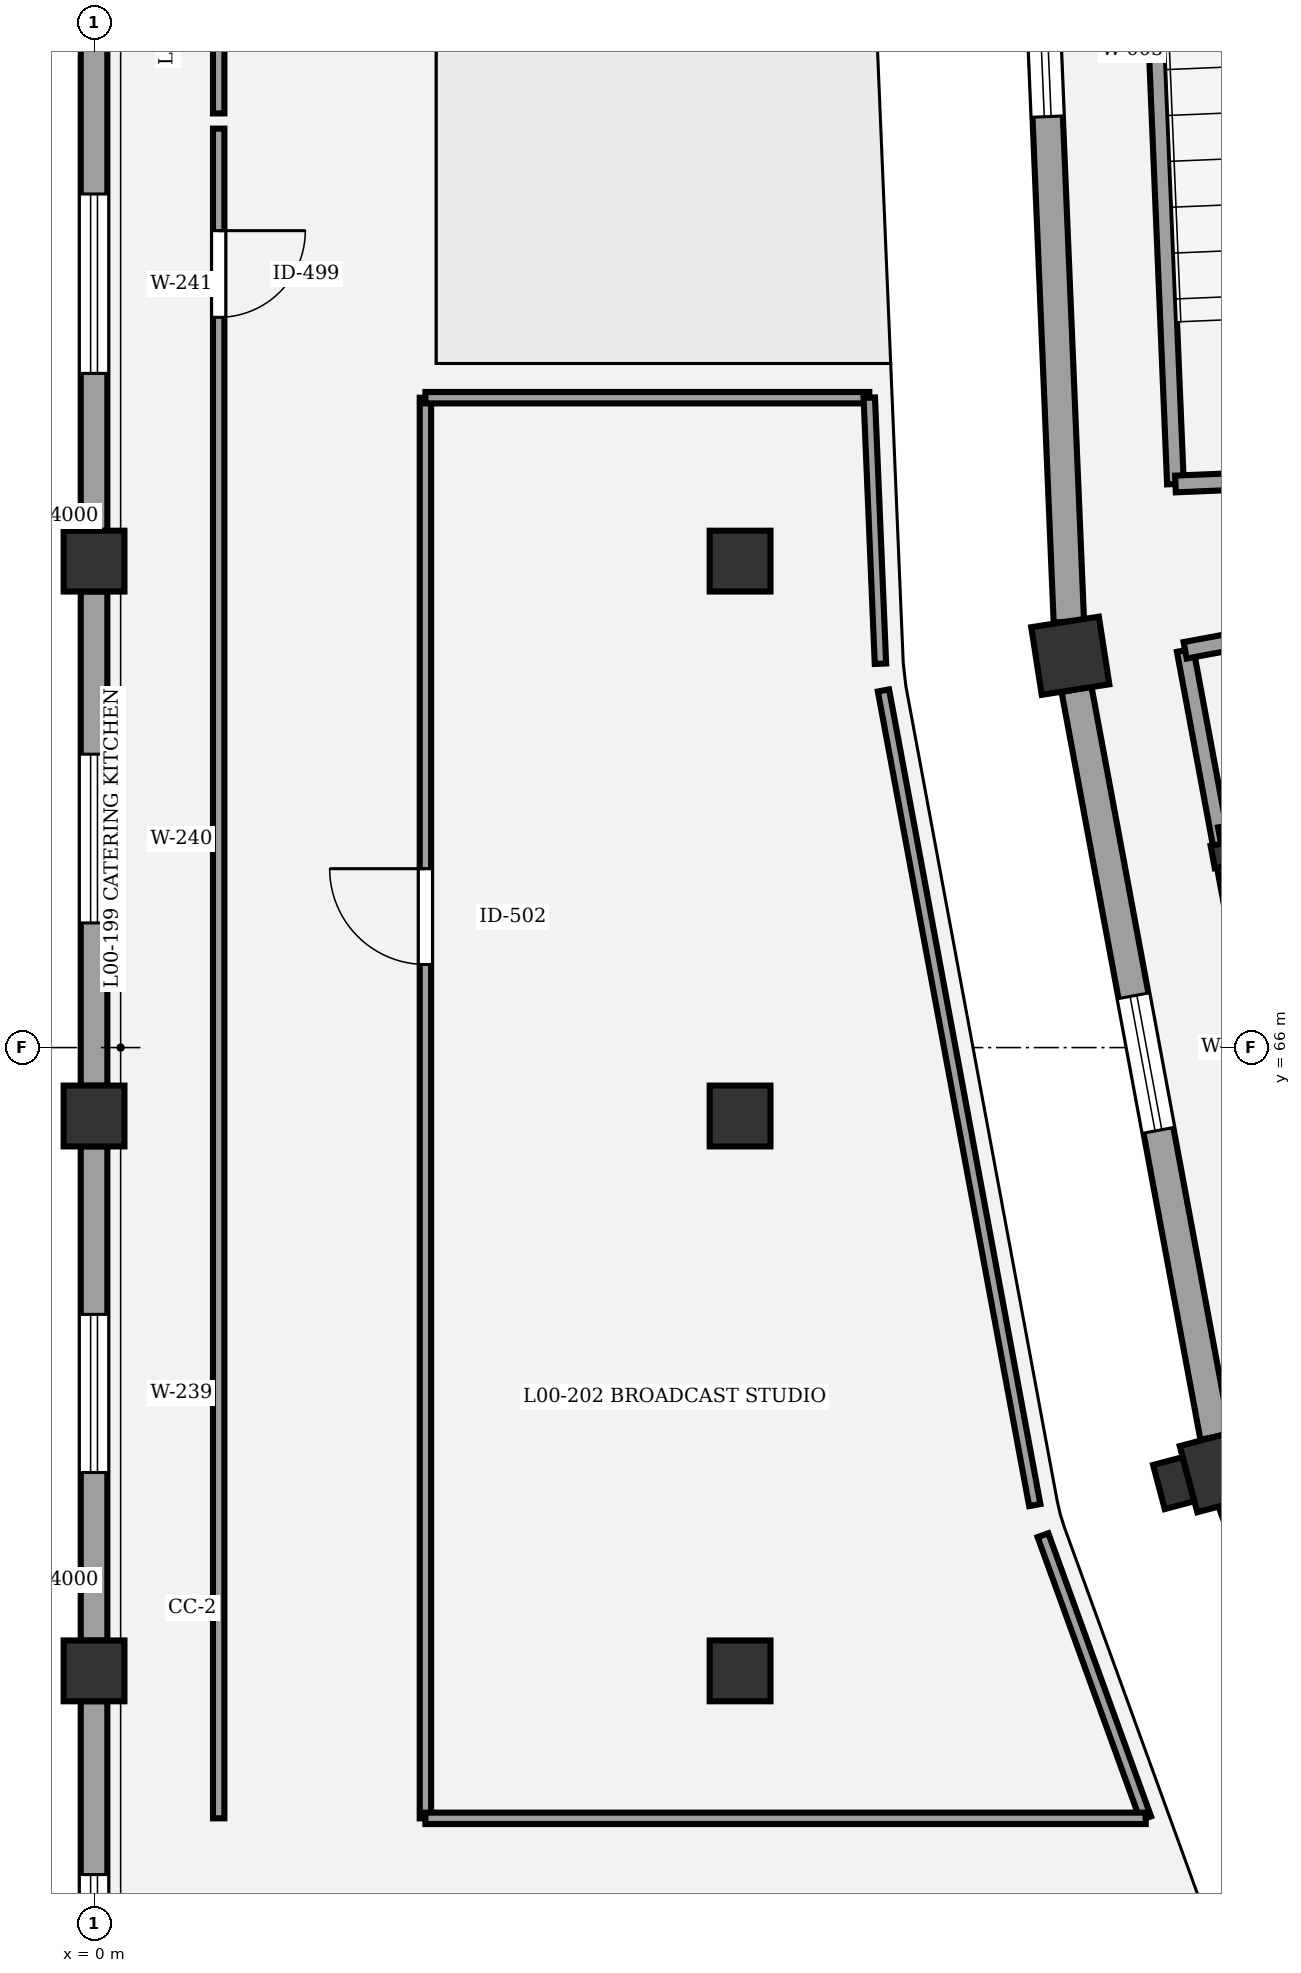
"""IFC4 building model, lengths in metres.
Left out: names, types, materials, properties, quantities, classifications, styles, units other than length and angle.
Written with IfcOpenShell. Run it as: python <this file> out.ifc"""

import sys

from ifc_helpers import new_model, si_unit, direction, frame, frame_2d, origin, origin_2d, place, context, subcontext, project, spatial, rectangle, circle, extrude, element, fill, save


model = new_model("IFC4")
c1 = context("Model", 3, precision=1e-05, world=origin(), true_north=direction((0.0, 1.0)))
c2 = subcontext(c1, "Body", "Model", "MODEL_VIEW")
j1 = project(units=[si_unit("LENGTHUNIT", "METRE"), si_unit("PLANEANGLEUNIT", "RADIAN")], contexts=[c1])
p1 = place(None, origin())
s1 = spatial("IfcSite", under=j1, at=p1, CompositionType="ELEMENT")
p2 = place(p1, origin())
s2 = spatial("IfcBuilding", under=s1, at=p2, CompositionType="ELEMENT")
p3 = place(p2, origin())
s3 = spatial("IfcBuildingStorey", under=s2, at=p3, CompositionType="ELEMENT", Elevation=0.0)
for number, where, z_axis, x_axis in (
    (1, (12.844, 71.155, 0.0), (0.0, 0.0, 1.0), (-0.988, -0.153, 0.0)),
    (2, (14.835, 60.438, 0.0), (0.0, 0.0, 1.0), (-0.967, -0.256, 0.0)),
):
    element("IfcColumn", number, at=place(p3, frame(where, z_axis=z_axis, x_axis=x_axis)), inside=s3, PredefinedType="COLUMN", context=c2, shape_type="SweptSolid", body=[
        extrude(rectangle(XDim=0.9, YDim=0.9, at=origin_2d()), origin(), (0.0, 0.0, 1.0), 5.4),
    ])
p4 = place(p3, frame((14.204, 60.27, 0.0), z_axis=(0.0, 0.0, 1.0), x_axis=(0.256289373133, -0.966600102017, 0.0)))
e3 = element("IfcColumn", 3, at=p4, inside=s3, PredefinedType="PILASTER", context=c2, shape_type="SweptSolid", body=[
    extrude(rectangle(XDim=0.6, YDim=0.4, at=origin_2d()), origin(), (0.0, 0.0, 1.0), 5.4),
])
for number, where, z_axis, x_axis in (
    (4, (0.0, 57.8, 0.0), (0.0, 0.0, 1.0), (1.0, 0.0, 0.0)),
    (5, (0.0, 65.1, 0.0), (0.0, 0.0, 1.0), (1.0, 0.0, 0.0)),
    (6, (0.0, 72.4, 0.0), (0.0, 0.0, 1.0), (1.0, 0.0, 0.0)),
    (7, (8.5, 57.8, 0.0), (0.0, 0.0, 1.0), (1.0, 0.0, 0.0)),
    (8, (8.5, 65.1, 0.0), (0.0, 0.0, 1.0), (1.0, 0.0, 0.0)),
    (9, (8.5, 72.4, 0.0), (0.0, 0.0, 1.0), (1.0, 0.0, 0.0)),
):
    element("IfcColumn", number, at=place(p3, frame(where, z_axis=z_axis, x_axis=x_axis)), inside=s3, PredefinedType="COLUMN", context=c2, shape_type="SweptSolid", body=[
        extrude(circle(Radius=0.4, at=origin_2d()), origin(), (0.0, 0.0, 1.0), 5.4),
    ])
p5 = place(p3, frame((12.826, 71.603, 0.0), z_axis=(0.0, 0.0, 1.0), x_axis=(-0.041899972393, 0.999121810548, 0.0)))
e10 = element("IfcWall", 10, at=p5, inside=s3, PredefinedType="STANDARD", context=c2, shape_type="SweptSolid", body=[
    extrude(rectangle(XDim=14.963, YDim=0.4, at=frame_2d((7.481, 0.0))), origin(), (0.0, 0.0, 1.0), 4.25),
])
p6 = place(p5, frame((6.652, 0.0, 1.1)))
e11 = element("IfcOpeningElement", 11, at=p6, cuts=e10, PredefinedType="OPENING", context=c2, shape_type="SweptSolid", body=[
    extrude(rectangle(XDim=1.66, YDim=1.55, at=frame_2d((0.83, 0.775))), frame((0.0, 0.21, 0.0), z_axis=(0.0, -1.0, 0.0), x_axis=(1.0, 0.0, 0.0)), (0.0, 0.0, 1.0), 0.42),
])
p7 = place(p3, frame((14.754, 60.878, 0.0), z_axis=(0.0, 0.0, 1.0), x_axis=(-0.182624880635, 0.98318266511, 0.0)))
e12 = element("IfcWall", 12, at=p7, inside=s3, PredefinedType="STANDARD", context=c2, shape_type="SweptSolid", body=[
    extrude(rectangle(XDim=10.005, YDim=0.4, at=frame_2d((5.002, 0.0))), origin(), (0.0, 0.0, 1.0), 4.25),
])
p8 = place(p7, frame((4.102, 0.0, 1.1)))
e13 = element("IfcOpeningElement", 13, at=p8, cuts=e12, PredefinedType="OPENING", context=c2, shape_type="SweptSolid", body=[
    extrude(rectangle(XDim=1.8, YDim=1.55, at=frame_2d((0.9, 0.775))), frame((0.0, 0.21, 0.0), z_axis=(0.0, -1.0, 0.0), x_axis=(1.0, 0.0, 0.0)), (0.0, 0.0, 1.0), 0.42),
])
p9 = place(p3, frame((17.991, 51.739, 0.0), z_axis=(0.0, 0.0, 1.0), x_axis=(-0.341030587203, 0.940052199929, 0.0)))
e14 = element("IfcWall", 14, at=p9, inside=s3, PredefinedType="STANDARD", context=c2, shape_type="SweptSolid", body=[
    extrude(rectangle(XDim=8.805, YDim=0.4, at=frame_2d((4.403, 0.0))), origin(), (0.0, 0.0, 1.0), 4.25),
])
p10 = place(p9, frame((3.603, 0.0, 0.0)))
e15 = element("IfcOpeningElement", 15, at=p10, cuts=e14, PredefinedType="OPENING", context=c2, shape_type="SweptSolid", body=[
    extrude(rectangle(XDim=1.6, YDim=2.3, at=frame_2d((0.8, 1.15))), frame((0.0, 0.21, 0.0), z_axis=(0.0, -1.0, 0.0), x_axis=(1.0, 0.0, 0.0)), (0.0, 0.0, 1.0), 0.42),
])
p11 = place(p3, frame((0.0, 50.898, 0.0), z_axis=(0.0, 0.0, 1.0), x_axis=(0.0, 1.0, 0.0)))
e16 = element("IfcWall", 16, at=p11, inside=s3, PredefinedType="STANDARD", context=c2, shape_type="SweptSolid", body=[
    extrude(rectangle(XDim=6.504, YDim=0.35, at=frame_2d((3.252, 0.0))), origin(), (0.0, 0.0, 1.0), 4.16),
])
p12 = place(p11, frame((2.282, 0.0, 0.9)))
e17 = element("IfcOpeningElement", 17, at=p12, cuts=e16, PredefinedType="OPENING", context=c2, shape_type="SweptSolid", body=[
    extrude(rectangle(XDim=1.94, YDim=1.75, at=frame_2d((0.97, 0.875))), frame((0.0, 0.185, 0.0), z_axis=(0.0, -1.0, 0.0), x_axis=(1.0, 0.0, 0.0)), (0.0, 0.0, 1.0), 0.37),
])
p13 = place(p3, frame((0.0, 58.198, 0.0), z_axis=(0.0, 0.0, 1.0), x_axis=(0.0, 1.0, 0.0)))
e18 = element("IfcWall", 18, at=p13, inside=s3, PredefinedType="STANDARD", context=c2, shape_type="SweptSolid", body=[
    extrude(rectangle(XDim=6.504, YDim=0.35, at=frame_2d((3.252, 0.0))), origin(), (0.0, 0.0, 1.0), 4.16),
])
p14 = place(p13, frame((2.212, 0.0, 0.9)))
e19 = element("IfcOpeningElement", 19, at=p14, cuts=e18, PredefinedType="OPENING", context=c2, shape_type="SweptSolid", body=[
    extrude(rectangle(XDim=2.08, YDim=1.75, at=frame_2d((1.04, 0.875))), frame((0.0, 0.185, 0.0), z_axis=(0.0, -1.0, 0.0), x_axis=(1.0, 0.0, 0.0)), (0.0, 0.0, 1.0), 0.37),
])
p15 = place(p3, frame((0.0, 65.498, 0.0), z_axis=(0.0, 0.0, 1.0), x_axis=(0.0, 1.0, 0.0)))
e20 = element("IfcWall", 20, at=p15, inside=s3, PredefinedType="STANDARD", context=c2, shape_type="SweptSolid", body=[
    extrude(rectangle(XDim=6.504, YDim=0.35, at=frame_2d((3.252, 0.0))), origin(), (0.0, 0.0, 1.0), 4.16),
])
p16 = place(p15, frame((2.142, 0.0, 0.9)))
e21 = element("IfcOpeningElement", 21, at=p16, cuts=e20, PredefinedType="OPENING", context=c2, shape_type="SweptSolid", body=[
    extrude(rectangle(XDim=2.22, YDim=1.75, at=frame_2d((1.11, 0.875))), frame((0.0, 0.185, 0.0), z_axis=(0.0, -1.0, 0.0), x_axis=(1.0, 0.0, 0.0)), (0.0, 0.0, 1.0), 0.37),
])
p17 = place(p3, frame((0.0, 72.798, 0.0), z_axis=(0.0, 0.0, 1.0), x_axis=(0.0, 1.0, 0.0)))
e22 = element("IfcWall", 22, at=p17, inside=s3, PredefinedType="STANDARD", context=c2, shape_type="SweptSolid", body=[
    extrude(rectangle(XDim=6.504, YDim=0.35, at=frame_2d((3.252, 0.0))), origin(), (0.0, 0.0, 1.0), 4.16),
])
p18 = place(p17, frame((2.072, 0.0, 0.9)))
e23 = element("IfcOpeningElement", 23, at=p18, cuts=e22, PredefinedType="OPENING", context=c2, shape_type="SweptSolid", body=[
    extrude(rectangle(XDim=2.36, YDim=1.75, at=frame_2d((1.18, 0.875))), frame((0.0, 0.185, 0.0), z_axis=(0.0, -1.0, 0.0), x_axis=(1.0, 0.0, 0.0)), (0.0, 0.0, 1.0), 0.37),
])
p19 = place(p3, frame((14.228, 73.415, 0.0), z_axis=(0.0, 0.0, 1.0), x_axis=(-0.041871977473, 0.999122984173, 0.0)))
e24 = element("IfcWall", 24, at=p19, inside=s3, PredefinedType="SHEAR", context=c2, shape_type="SweptSolid", body=[
    extrude(rectangle(XDim=11.02, YDim=0.22, at=frame_2d((5.51, 0.0))), origin(), (0.0, 0.0, 1.0), 5.15),
])
p20 = place(p3, frame((18.635, 73.6, 0.0), z_axis=(0.0, 0.0, 1.0), x_axis=(-0.999121521721, -0.041906859039, 0.0)))
e25 = element("IfcWall", 25, at=p20, inside=s3, PredefinedType="SHEAR", context=c2, shape_type="SweptSolid", body=[
    extrude(rectangle(XDim=4.41, YDim=0.22, at=frame_2d((2.205, 0.0))), origin(), (0.0, 0.0, 1.0), 5.15),
])
p21 = place(p3, frame((14.827, 68.527, 0.0), z_axis=(0.0, 0.0, 1.0), x_axis=(-0.182578735093, 0.983191235463, 0.0)))
e26 = element("IfcColumn", 26, at=p21, inside=s3, PredefinedType="COLUMN", context=c2, shape_type="SweptSolid", body=[
    extrude(rectangle(XDim=0.3, YDim=0.22, at=origin_2d()), origin(), (0.0, 0.0, 1.0), 5.4),
])
p22 = place(p3, frame((16.368, 60.392, 0.0), z_axis=(0.0, 0.0, 1.0), x_axis=(-0.182570778451, 0.983192712979, 0.0)))
e27 = element("IfcWall", 27, at=p22, inside=s3, PredefinedType="SHEAR", context=c2, shape_type="SweptSolid", body=[
    extrude(rectangle(XDim=11.02, YDim=0.22, at=frame_2d((5.51, 0.0))), origin(), (0.0, 0.0, 1.0), 5.15),
])
p23 = place(p3, frame((18.692, 72.032, 0.0), z_axis=(0.0, 0.0, 1.0), x_axis=(-0.983191575486, -0.182576904051, 0.0)))
e28 = element("IfcWall", 28, at=p23, inside=s3, PredefinedType="SHEAR", context=c2, shape_type="SweptSolid", body=[
    extrude(rectangle(XDim=4.41, YDim=0.22, at=frame_2d((2.205, 0.0))), origin(), (0.0, 0.0, 1.0), 5.15),
])
p24 = place(p3, frame((19.145, 69.594, 0.0), z_axis=(0.0, 0.0, 1.0), x_axis=(-0.983189729951, -0.18258684213, 0.0)))
e29 = element("IfcWall", 29, at=p24, inside=s3, PredefinedType="SHEAR", context=c2, shape_type="SweptSolid", body=[
    extrude(rectangle(XDim=4.41, YDim=0.22, at=frame_2d((2.205, 0.0))), origin(), (0.0, 0.0, 1.0), 5.15),
])
p25 = place(p3, frame((1.64, 78.09, 0.0), z_axis=(0.0, 0.0, 1.0), x_axis=(0.0, -1.0, 0.0)))
e30 = element("IfcWall", 30, at=p25, inside=s3, PredefinedType="PARTITIONING", context=c2, shape_type="SweptSolid", body=[
    extrude(rectangle(XDim=22.23, YDim=0.15, at=frame_2d((11.115, 0.0))), origin(), (0.0, 0.0, 1.0), 4.15),
])
p26 = place(p25, frame((1.343, 0.0, 0.0)))
e31 = element("IfcOpeningElement", 31, at=p26, cuts=e30, PredefinedType="OPENING", context=c2, shape_type="SweptSolid", body=[
    extrude(rectangle(XDim=1.14, YDim=2.3, at=frame_2d((0.57, 1.15))), frame((0.0, 0.085, 0.0), z_axis=(0.0, -1.0, 0.0), x_axis=(1.0, 0.0, 0.0)), (0.0, 0.0, 1.0), 0.17),
])
p27 = place(p3, frame((1.64, 100.52, 0.0), z_axis=(0.0, 0.0, 1.0), x_axis=(0.0, -1.0, 0.0)))
e32 = element("IfcWall", 32, at=p27, inside=s3, PredefinedType="PARTITIONING", context=c2, shape_type="SweptSolid", body=[
    extrude(rectangle(XDim=22.23, YDim=0.15, at=frame_2d((11.115, 0.0))), origin(), (0.0, 0.0, 1.0), 4.15),
])
p28 = place(p27, frame((16.648, 0.0, 0.0)))
e33 = element("IfcOpeningElement", 33, at=p28, cuts=e32, PredefinedType="OPENING", context=c2, shape_type="SweptSolid", body=[
    extrude(rectangle(XDim=1.18, YDim=2.3, at=frame_2d((0.59, 1.15))), frame((0.0, 0.085, 0.0), z_axis=(0.0, -1.0, 0.0), x_axis=(1.0, 0.0, 0.0)), (0.0, 0.0, 1.0), 0.17),
])
p29 = place(p3, frame((4.36, 55.86, 0.0), z_axis=(0.0, 0.0, 1.0), x_axis=(0.0, 1.0, 0.0)))
e34 = element("IfcWall", 34, at=p29, inside=s3, PredefinedType="PARTITIONING", context=c2, shape_type="SweptSolid", body=[
    extrude(rectangle(XDim=18.69, YDim=0.15, at=frame_2d((9.345, 0.0))), origin(), (0.0, 0.0, 1.0), 4.15),
])
p30 = place(p29, frame((11.233, 0.0, 0.0)))
e35 = element("IfcOpeningElement", 35, at=p30, cuts=e34, PredefinedType="OPENING", context=c2, shape_type="SweptSolid", body=[
    extrude(rectangle(XDim=1.26, YDim=2.3, at=frame_2d((0.63, 1.15))), frame((0.0, 0.085, 0.0), z_axis=(0.0, -1.0, 0.0), x_axis=(1.0, 0.0, 0.0)), (0.0, 0.0, 1.0), 0.17),
])
p31 = place(p3, frame((10.387, 70.698, 0.0), z_axis=(0.0, 0.0, 1.0), x_axis=(0.182620957058, -0.983183393901, 0.0)))
e36 = element("IfcWall", 36, at=p31, inside=s3, PredefinedType="PARTITIONING", context=c2, shape_type="SweptSolid", body=[
    extrude(rectangle(XDim=10.901, YDim=0.15, at=frame_2d((5.45, 0.0))), origin(), (0.0, 0.0, 1.0), 4.15),
])
p32 = place(p3, frame((12.485, 59.585, 0.0), z_axis=(0.0, 0.0, 1.0), x_axis=(0.341035525383, -0.94005040845, 0.0)))
e37 = element("IfcWall", 37, at=p32, inside=s3, PredefinedType="PARTITIONING", context=c2, shape_type="SweptSolid", body=[
    extrude(rectangle(XDim=3.962, YDim=0.15, at=frame_2d((1.981, 0.0))), origin(), (0.0, 0.0, 1.0), 4.15),
])
p33 = place(p3, frame((13.837, 55.86, 0.0), z_axis=(0.0, 0.0, 1.0), x_axis=(-1.0, 0.0, 0.0)))
e38 = element("IfcWall", 38, at=p33, inside=s3, PredefinedType="PARTITIONING", context=c2, shape_type="SweptSolid", body=[
    extrude(rectangle(XDim=9.477, YDim=0.15, at=frame_2d((4.738, 0.0))), origin(), (0.0, 0.0, 1.0), 4.15),
])
p34 = place(p3, frame((4.36, 74.55, 0.0), z_axis=(0.0, 0.0, 1.0), x_axis=(1.0, 0.0, 0.0)))
e39 = element("IfcWall", 39, at=p34, inside=s3, PredefinedType="PARTITIONING", context=c2, shape_type="SweptSolid", body=[
    extrude(rectangle(XDim=5.84, YDim=0.15, at=frame_2d((2.92, 0.0))), origin(), (0.0, 0.0, 1.0), 4.15),
])
p35 = place(p3, frame((10.2, 74.55, 0.0), z_axis=(0.0, 0.0, 1.0), x_axis=(0.041888559174, -0.999122289117, 0.0)))
e40 = element("IfcWall", 40, at=p35, inside=s3, PredefinedType="PARTITIONING", context=c2, shape_type="SweptSolid", body=[
    extrude(rectangle(XDim=3.503, YDim=0.15, at=frame_2d((1.751, 0.0))), origin(), (0.0, 0.0, 1.0), 4.15),
])
p36 = place(p6, origin())
e41 = element("IfcWindow", 41, at=p36, inside=s3, PartitioningType="SINGLE_PANEL", PredefinedType="WINDOW", context=c2, shape_type="SweptSolid", body=[
    extrude(rectangle(XDim=1.66, YDim=1.55, at=frame_2d((0.83, 0.775))), frame((0.0, 0.03, 0.0), z_axis=(0.0, -1.0, 0.0), x_axis=(1.0, 0.0, 0.0)), (0.0, 0.0, 1.0), 0.06),
])
fill(e11, e41)
p37 = place(p8, origin())
e42 = element("IfcWindow", 42, at=p37, inside=s3, PartitioningType="SINGLE_PANEL", PredefinedType="WINDOW", context=c2, shape_type="SweptSolid", body=[
    extrude(rectangle(XDim=1.8, YDim=1.55, at=frame_2d((0.9, 0.775))), frame((0.0, 0.03, 0.0), z_axis=(0.0, -1.0, 0.0), x_axis=(1.0, 0.0, 0.0)), (0.0, 0.0, 1.0), 0.06),
])
fill(e13, e42)
p38 = place(p12, origin())
e43 = element("IfcWindow", 43, at=p38, inside=s3, PartitioningType="SINGLE_PANEL", PredefinedType="WINDOW", context=c2, shape_type="SweptSolid", body=[
    extrude(rectangle(XDim=1.94, YDim=1.75, at=frame_2d((0.97, 0.875))), frame((0.0, 0.03, 0.0), z_axis=(0.0, -1.0, 0.0), x_axis=(1.0, 0.0, 0.0)), (0.0, 0.0, 1.0), 0.06),
])
fill(e17, e43)
p39 = place(p14, origin())
e44 = element("IfcWindow", 44, at=p39, inside=s3, PartitioningType="SINGLE_PANEL", PredefinedType="WINDOW", context=c2, shape_type="SweptSolid", body=[
    extrude(rectangle(XDim=2.08, YDim=1.75, at=frame_2d((1.04, 0.875))), frame((0.0, 0.03, 0.0), z_axis=(0.0, -1.0, 0.0), x_axis=(1.0, 0.0, 0.0)), (0.0, 0.0, 1.0), 0.06),
])
fill(e19, e44)
p40 = place(p16, origin())
e45 = element("IfcWindow", 45, at=p40, inside=s3, PartitioningType="SINGLE_PANEL", PredefinedType="WINDOW", context=c2, shape_type="SweptSolid", body=[
    extrude(rectangle(XDim=2.22, YDim=1.75, at=frame_2d((1.11, 0.875))), frame((0.0, 0.03, 0.0), z_axis=(0.0, -1.0, 0.0), x_axis=(1.0, 0.0, 0.0)), (0.0, 0.0, 1.0), 0.06),
])
fill(e21, e45)
p41 = place(p18, origin())
e46 = element("IfcWindow", 46, at=p41, inside=s3, PartitioningType="SINGLE_PANEL", PredefinedType="WINDOW", context=c2, shape_type="SweptSolid", body=[
    extrude(rectangle(XDim=2.36, YDim=1.75, at=frame_2d((1.18, 0.875))), frame((0.0, 0.03, 0.0), z_axis=(0.0, -1.0, 0.0), x_axis=(1.0, 0.0, 0.0)), (0.0, 0.0, 1.0), 0.06),
])
fill(e23, e46)
p42 = place(p26, origin())
e47 = element("IfcDoor", 47, at=p42, inside=s3, OperationType="SINGLE_SWING_LEFT", PredefinedType="DOOR", context=c2, shape_type="SweptSolid", body=[
    extrude(rectangle(XDim=1.14, YDim=2.3, at=frame_2d((0.57, 1.15))), frame((0.0, 0.025, 0.0), z_axis=(0.0, -1.0, 0.0), x_axis=(1.0, 0.0, 0.0)), (0.0, 0.0, 1.0), 0.05),
])
fill(e31, e47)
p43 = place(p30, origin())
e48 = element("IfcDoor", 48, at=p43, inside=s3, OperationType="SINGLE_SWING_RIGHT", PredefinedType="DOOR", context=c2, shape_type="SweptSolid", body=[
    extrude(rectangle(XDim=1.26, YDim=2.3, at=frame_2d((0.63, 1.15))), frame((0.0, 0.025, 0.0), z_axis=(0.0, -1.0, 0.0), x_axis=(1.0, 0.0, 0.0)), (0.0, 0.0, 1.0), 0.05),
])
fill(e35, e48)
save(model, sys.argv[1])
